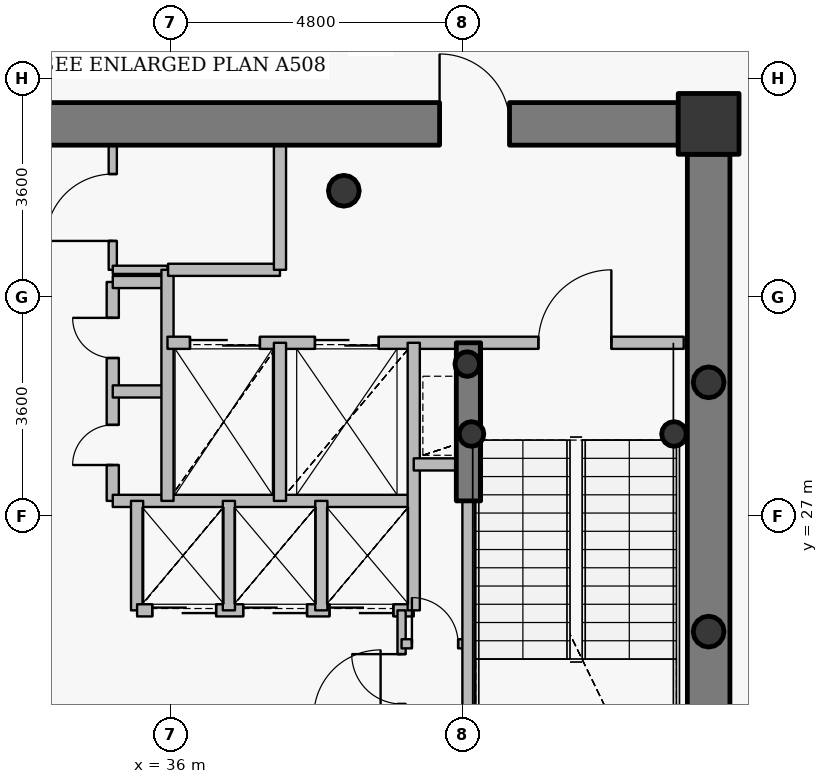
"""IFC4 building model, lengths in metres.
Left out: names, types, materials, properties, quantities, classifications, styles, units other than length and angle.
Written with IfcOpenShell. Run it as: python <this file> out.ifc"""

import sys

from ifc_helpers import new_model, si_unit, direction, frame, frame_2d, origin, origin_2d, place, context, subcontext, project, spatial, rectangle, hollow_circle, extrude, source, transform, mapped, element, fill, save


model = new_model("IFC4")
c1 = context("Model", 3, precision=1e-05, world=origin(), true_north=direction((0.0, 1.0)))
c2 = subcontext(c1, "Body", "Model", "MODEL_VIEW")
j1 = project(units=[si_unit("LENGTHUNIT", "METRE"), si_unit("PLANEANGLEUNIT", "RADIAN")], contexts=[c1])
p1 = place(None, origin())
s1 = spatial("IfcSite", under=j1, at=p1, CompositionType="ELEMENT")
p2 = place(p1, origin())
s2 = spatial("IfcBuilding", under=s1, at=p2, CompositionType="ELEMENT")
p3 = place(p2, frame((0.0, 0.0, 303.0)))
s3 = spatial("IfcBuildingStorey", under=s2, at=p3, CompositionType="ELEMENT", Elevation=303.0)
p4 = place(p3, frame((44.85, 33.45, 0.0), z_axis=(0.0, 0.0, 1.0), x_axis=(1.0, 0.0, 0.0)))
e1 = element("IfcColumn", 1, at=p4, inside=s3, PredefinedType="COLUMN", context=c2, shape_type="SweptSolid", body=[
    extrude(rectangle(XDim=1.0, YDim=1.0, at=origin_2d()), origin(), (0.0, 0.0, 1.0), 3.75),
])
p5 = place(p3, frame((38.85, 32.35, 0.0), z_axis=(0.0, 0.0, 1.0), x_axis=(1.0, 0.0, 0.0)))
e2 = element("IfcColumn", 2, at=p5, inside=s3, PredefinedType="COLUMN", context=c2, shape_type="SweptSolid", body=[
    extrude(hollow_circle(Radius=0.254, WallThickness=0.02, at=origin_2d()), origin(), (0.0, 0.0, 1.0), 3.75),
])
for number, where, z_axis, x_axis in (
    (3, (40.95, 28.35, 0.0), (0.0, 0.0, 1.0), (1.0, 0.0, 0.0)),
    (4, (44.28, 28.35, 0.0), (0.0, 0.0, 1.0), (1.0, 0.0, 0.0)),
    (5, (40.88, 29.5, 0.0), (0.0, 0.0, 1.0), (1.0, 0.0, 0.0)),
):
    element("IfcColumn", number, at=place(p3, frame(where, z_axis=z_axis, x_axis=x_axis)), inside=s3, PredefinedType="COLUMN", context=c2, shape_type="SweptSolid", body=[
        extrude(hollow_circle(Radius=0.203, WallThickness=0.016, at=origin_2d()), origin(), (0.0, 0.0, 1.0), 3.75),
    ])
p6 = place(p3, frame((27.65, 33.45, 0.0), z_axis=(0.0, 0.0, 1.0), x_axis=(1.0, 0.0, 0.0)))
e6 = element("IfcWall", 6, at=p6, inside=s3, PredefinedType="SHEAR", context=c2, shape_type="SweptSolid", body=[
    extrude(rectangle(XDim=16.7, YDim=0.7, at=frame_2d((8.35, 0.0))), origin(), (0.0, 0.0, 1.0), 3.05),
])
p7 = place(p6, frame((12.775, 0.0, 0.0)))
e7 = element("IfcOpeningElement", 7, at=p7, cuts=e6, PredefinedType="OPENING", context=c2, shape_type="SweptSolid", body=[
    extrude(rectangle(XDim=1.15, YDim=2.15, at=origin_2d()), frame((0.575, 0.36, 1.075), z_axis=(0.0, -1.0, 0.0), x_axis=(1.0, 0.0, 0.0)), (0.0, 0.0, 1.0), 0.72),
])
p8 = place(p3, frame((44.85, 32.95, 0.0), z_axis=(0.0, 0.0, 1.0), x_axis=(0.0, -1.0, 0.0)))
e8 = element("IfcWall", 8, at=p8, inside=s3, PredefinedType="SHEAR", context=c2, shape_type="SweptSolid", body=[
    extrude(rectangle(XDim=11.9, YDim=0.7, at=frame_2d((5.95, 0.0))), origin(), (0.0, 0.0, 1.0), 3.05),
])
p9 = place(p3, frame((40.9, 27.25, 0.0), z_axis=(0.0, 0.0, 1.0), x_axis=(0.0, 1.0, 0.0)))
e9 = element("IfcWall", 9, at=p9, inside=s3, PredefinedType="SHEAR", context=c2, shape_type="SweptSolid", body=[
    extrude(rectangle(XDim=2.6, YDim=0.4, at=frame_2d((1.3, 0.0))), origin(), (0.0, 0.0, 1.0), 3.1),
])
for number, where, z_axis, x_axis in (
    (10, (44.85, 25.1, 0.0), (0.0, 0.0, 1.0), (1.0, 0.0, 0.0)),
    (11, (44.85, 29.2, 0.0), (0.0, 0.0, 1.0), (1.0, 0.0, 0.0)),
):
    element("IfcColumn", number, at=place(p3, frame(where, z_axis=z_axis, x_axis=x_axis)), inside=s3, PredefinedType="COLUMN", context=c2, shape_type="SweptSolid", body=[
        extrude(hollow_circle(Radius=0.254, WallThickness=0.02, at=origin_2d()), origin(), (0.0, 0.0, 1.0), 3.75),
    ])
p10 = place(p3, frame((35.05, 27.25, 0.0), z_axis=(0.0, 0.0, 1.0), x_axis=(0.0, 1.0, 0.0)))
e12 = element("IfcWall", 12, at=p10, inside=s3, PredefinedType="PARTITIONING", context=c2, shape_type="SweptSolid", body=[
    extrude(rectangle(XDim=3.6, YDim=0.2, at=frame_2d((1.8, 0.0))), origin(), (0.0, 0.0, 1.0), 3.5),
])
p11 = place(p10, frame((0.59, 0.0, 0.0)))
e13 = element("IfcOpeningElement", 13, at=p11, cuts=e12, PredefinedType="OPENING", context=c2, shape_type="SweptSolid", body=[
    extrude(rectangle(XDim=0.66, YDim=2.05, at=origin_2d()), frame((0.33, 0.11, 1.025), z_axis=(0.0, -1.0, 0.0), x_axis=(1.0, 0.0, 0.0)), (0.0, 0.0, 1.0), 0.22),
])
p12 = place(p10, frame((2.35, 0.0, 0.0)))
e14 = element("IfcOpeningElement", 14, at=p12, cuts=e12, PredefinedType="OPENING", context=c2, shape_type="SweptSolid", body=[
    extrude(rectangle(XDim=0.66, YDim=2.05, at=origin_2d()), frame((0.33, 0.11, 1.025), z_axis=(0.0, -1.0, 0.0), x_axis=(1.0, 0.0, 0.0)), (0.0, 0.0, 1.0), 0.22),
])
p13 = place(p3, frame((35.05, 27.25, 0.0), z_axis=(0.0, 0.0, 1.0), x_axis=(1.0, 0.0, 0.0)))
e15 = element("IfcWall", 15, at=p13, inside=s3, PredefinedType="PARTITIONING", context=c2, shape_type="SweptSolid", body=[
    extrude(rectangle(XDim=4.95, YDim=0.2, at=frame_2d((2.475, 0.0))), origin(), (0.0, 0.0, 1.0), 3.085),
])
for number, where, z_axis, x_axis in (
    (16, (35.05, 29.05, 0.0), (0.0, 0.0, 1.0), (1.0, 0.0, 0.0)),
    (17, (35.05, 30.85, 0.0), (0.0, 0.0, 1.0), (1.0, 0.0, 0.0)),
):
    element("IfcWall", number, at=place(p3, frame(where, z_axis=z_axis, x_axis=x_axis)), inside=s3, PredefinedType="PARTITIONING", context=c2, shape_type="SweptSolid", body=[
        extrude(rectangle(XDim=0.9, YDim=0.2, at=frame_2d((0.45, 0.0))), origin(), (0.0, 0.0, 1.0), 3.5),
    ])
p14 = place(p3, frame((35.05, 31.05, 0.0), z_axis=(0.0, 0.0, 1.0), x_axis=(0.0, 1.0, 0.0)))
e18 = element("IfcWall", 18, at=p14, inside=s3, PredefinedType="PARTITIONING", context=c2, shape_type="SweptSolid", body=[
    extrude(rectangle(XDim=2.05, YDim=0.135, at=frame_2d((1.025, 0.0))), origin(), (0.0, 0.0, 1.0), 3.085),
])
p15 = place(p14, frame((0.475, 0.0, 0.0)))
e19 = element("IfcOpeningElement", 19, at=p15, cuts=e18, PredefinedType="OPENING", context=c2, shape_type="SweptSolid", body=[
    extrude(rectangle(XDim=1.1, YDim=2.15, at=origin_2d()), frame((0.55, 0.078, 1.075), z_axis=(0.0, -1.0, 0.0), x_axis=(1.0, 0.0, 0.0)), (0.0, 0.0, 1.0), 0.155),
])
p16 = place(p3, frame((35.05, 31.05, 0.0), z_axis=(0.0, 0.0, 1.0), x_axis=(1.0, 0.0, 0.0)))
e20 = element("IfcWall", 20, at=p16, inside=s3, PredefinedType="PARTITIONING", context=c2, shape_type="SweptSolid", body=[
    extrude(rectangle(XDim=0.9, YDim=0.135, at=frame_2d((0.45, 0.0))), origin(), (0.0, 0.0, 1.0), 3.5),
])
p17 = place(p3, frame((35.45, 25.45, 0.0), z_axis=(0.0, 0.0, 1.0), x_axis=(0.0, 1.0, 0.0)))
e21 = element("IfcWall", 21, at=p17, inside=s3, PredefinedType="PARTITIONING", context=c2, shape_type="SweptSolid", body=[
    extrude(rectangle(XDim=1.8, YDim=0.2, at=frame_2d((0.9, 0.0))), origin(), (0.0, 0.0, 1.0), 3.5),
])
p18 = place(p3, frame((35.45, 25.45, 0.0), z_axis=(0.0, 0.0, 1.0), x_axis=(1.0, 0.0, 0.0)))
e22 = element("IfcWall", 22, at=p18, inside=s3, PredefinedType="PARTITIONING", context=c2, shape_type="SweptSolid", body=[
    extrude(rectangle(XDim=4.55, YDim=0.2, at=frame_2d((2.275, 0.0))), origin(), (0.0, 0.0, 1.0), 3.085),
])
p19 = place(p18, frame((0.25, 0.0, 0.0)))
e23 = element("IfcOpeningElement", 23, at=p19, cuts=e22, PredefinedType="OPENING", context=c2, shape_type="SweptSolid", body=[
    extrude(rectangle(XDim=1.05, YDim=2.15, at=origin_2d()), frame((0.525, 0.11, 1.075), z_axis=(0.0, -1.0, 0.0), x_axis=(1.0, 0.0, 0.0)), (0.0, 0.0, 1.0), 0.22),
])
p20 = place(p18, frame((1.745, 0.0, 0.0)))
e24 = element("IfcOpeningElement", 24, at=p20, cuts=e22, PredefinedType="OPENING", context=c2, shape_type="SweptSolid", body=[
    extrude(rectangle(XDim=1.05, YDim=2.15, at=origin_2d()), frame((0.525, 0.11, 1.075), z_axis=(0.0, -1.0, 0.0), x_axis=(1.0, 0.0, 0.0)), (0.0, 0.0, 1.0), 0.22),
])
p21 = place(p18, frame((3.165, 0.0, 0.0)))
e25 = element("IfcOpeningElement", 25, at=p21, cuts=e22, PredefinedType="OPENING", context=c2, shape_type="SweptSolid", body=[
    extrude(rectangle(XDim=1.05, YDim=2.15, at=origin_2d()), frame((0.525, 0.11, 1.075), z_axis=(0.0, -1.0, 0.0), x_axis=(1.0, 0.0, 0.0)), (0.0, 0.0, 1.0), 0.22),
])
p22 = place(p3, frame((35.95, 27.25, 0.0), z_axis=(0.0, 0.0, 1.0), x_axis=(0.0, 1.0, 0.0)))
e26 = element("IfcWall", 26, at=p22, inside=s3, PredefinedType="PARTITIONING", context=c2, shape_type="SweptSolid", body=[
    extrude(rectangle(XDim=3.8, YDim=0.2, at=frame_2d((1.9, 0.0))), origin(), (0.0, 0.0, 1.0), 3.5),
])
p23 = place(p3, frame((35.95, 29.85, 0.0), z_axis=(0.0, 0.0, 1.0), x_axis=(1.0, 0.0, 0.0)))
e27 = element("IfcWall", 27, at=p23, inside=s3, PredefinedType="PARTITIONING", context=c2, shape_type="SweptSolid", body=[
    extrude(rectangle(XDim=8.49, YDim=0.2, at=frame_2d((4.245, 0.0))), origin(), (0.0, 0.0, 1.0), 3.085),
])
p24 = place(p23, frame((6.1, 0.0, 0.0)))
e28 = element("IfcOpeningElement", 28, at=p24, cuts=e27, PredefinedType="OPENING", context=c2, shape_type="SweptSolid", body=[
    extrude(rectangle(XDim=1.2, YDim=2.15, at=origin_2d()), frame((0.6, 0.11, 1.075), z_axis=(0.0, -1.0, 0.0), x_axis=(1.0, 0.0, 0.0)), (0.0, 0.0, 1.0), 0.22),
])
p25 = place(p23, frame((0.37, 0.0, 0.0)))
e29 = element("IfcOpeningElement", 29, at=p25, cuts=e27, PredefinedType="OPENING", context=c2, shape_type="SweptSolid", body=[
    extrude(rectangle(XDim=1.15, YDim=2.15, at=origin_2d()), frame((0.575, 0.11, 1.075), z_axis=(0.0, -1.0, 0.0), x_axis=(1.0, 0.0, 0.0)), (0.0, 0.0, 1.0), 0.22),
])
p26 = place(p23, frame((2.425, 0.0, 0.0)))
e30 = element("IfcOpeningElement", 30, at=p26, cuts=e27, PredefinedType="OPENING", context=c2, shape_type="SweptSolid", body=[
    extrude(rectangle(XDim=1.05, YDim=2.15, at=origin_2d()), frame((0.525, 0.11, 1.075), z_axis=(0.0, -1.0, 0.0), x_axis=(1.0, 0.0, 0.0)), (0.0, 0.0, 1.0), 0.22),
])
p27 = place(p3, frame((35.96, 31.05, 0.0), z_axis=(0.0, 0.0, 1.0), x_axis=(1.0, 0.0, 0.0)))
e31 = element("IfcWall", 31, at=p27, inside=s3, PredefinedType="PARTITIONING", context=c2, shape_type="SweptSolid", body=[
    extrude(rectangle(XDim=1.84, YDim=0.2, at=frame_2d((0.92, 0.0))), origin(), (0.0, 0.0, 1.0), 3.5),
])
p28 = place(p3, frame((36.96, 25.45, 0.0), z_axis=(0.0, 0.0, 1.0), x_axis=(0.0, 1.0, 0.0)))
e32 = element("IfcWall", 32, at=p28, inside=s3, PredefinedType="PARTITIONING", context=c2, shape_type="SweptSolid", body=[
    extrude(rectangle(XDim=1.8, YDim=0.2, at=frame_2d((0.9, 0.0))), origin(), (0.0, 0.0, 1.0), 3.5),
])
p29 = place(p3, frame((37.8, 27.25, 0.0), z_axis=(0.0, 0.0, 1.0), x_axis=(0.0, 1.0, 0.0)))
e33 = element("IfcWall", 33, at=p29, inside=s3, PredefinedType="PARTITIONING", context=c2, shape_type="SweptSolid", body=[
    extrude(rectangle(XDim=2.6, YDim=0.2, at=frame_2d((1.3, 0.0))), origin(), (0.0, 0.0, 1.0), 3.5),
])
p30 = place(p3, frame((37.8, 31.05, 0.0), z_axis=(0.0, 0.0, 1.0), x_axis=(0.0, 1.0, 0.0)))
e34 = element("IfcWall", 34, at=p30, inside=s3, PredefinedType="PARTITIONING", context=c2, shape_type="SweptSolid", body=[
    extrude(rectangle(XDim=2.05, YDim=0.2, at=frame_2d((1.025, 0.0))), origin(), (0.0, 0.0, 1.0), 3.085),
])
p31 = place(p3, frame((38.48, 25.45, 0.0), z_axis=(0.0, 0.0, 1.0), x_axis=(0.0, 1.0, 0.0)))
e35 = element("IfcWall", 35, at=p31, inside=s3, PredefinedType="PARTITIONING", context=c2, shape_type="SweptSolid", body=[
    extrude(rectangle(XDim=1.8, YDim=0.2, at=frame_2d((0.9, 0.0))), origin(), (0.0, 0.0, 1.0), 3.5),
])
p32 = place(p3, frame((39.8, 23.7, 0.0), z_axis=(0.0, 0.0, 1.0), x_axis=(0.0, 1.0, 0.0)))
e36 = element("IfcWall", 36, at=p32, inside=s3, PredefinedType="PARTITIONING", context=c2, shape_type="SweptSolid", body=[
    extrude(rectangle(XDim=1.75, YDim=0.135, at=frame_2d((0.875, 0.0))), origin(), (0.0, 0.0, 1.0), 3.5),
])
p33 = place(p32, frame((0.21, 0.0, 0.0)))
e37 = element("IfcOpeningElement", 37, at=p33, cuts=e36, PredefinedType="OPENING", context=c2, shape_type="SweptSolid", body=[
    extrude(rectangle(XDim=0.82, YDim=2.1, at=origin_2d()), frame((0.41, 0.078, 1.05), z_axis=(0.0, -1.0, 0.0), x_axis=(1.0, 0.0, 0.0)), (0.0, 0.0, 1.0), 0.155),
])
p34 = place(p3, frame((39.8, 24.9, 0.0), z_axis=(0.0, 0.0, 1.0), x_axis=(1.0, 0.0, 0.0)))
e38 = element("IfcWall", 38, at=p34, inside=s3, PredefinedType="PARTITIONING", context=c2, shape_type="SweptSolid", body=[
    extrude(rectangle(XDim=1.1, YDim=0.15, at=frame_2d((0.55, 0.0))), origin(), (0.0, 0.0, 1.0), 3.5),
])
p35 = place(p34, frame((0.17, 0.0, 0.0)))
e39 = element("IfcOpeningElement", 39, at=p35, cuts=e38, PredefinedType="OPENING", context=c2, shape_type="SweptSolid", body=[
    extrude(rectangle(XDim=0.76, YDim=2.1, at=origin_2d()), frame((0.38, 0.085, 1.05), z_axis=(0.0, -1.0, 0.0), x_axis=(1.0, 0.0, 0.0)), (0.0, 0.0, 1.0), 0.17),
])
p36 = place(p3, frame((40.0, 25.45, 0.0), z_axis=(0.0, 0.0, 1.0), x_axis=(0.0, 1.0, 0.0)))
e40 = element("IfcWall", 40, at=p36, inside=s3, PredefinedType="PARTITIONING", context=c2, shape_type="SweptSolid", body=[
    extrude(rectangle(XDim=4.4, YDim=0.2, at=frame_2d((2.2, 0.0))), origin(), (0.0, 0.0, 1.0), 3.5),
])
p37 = place(p3, frame((40.0, 27.85, 0.0), z_axis=(0.0, 0.0, 1.0), x_axis=(1.0, 0.0, 0.0)))
e41 = element("IfcWall", 41, at=p37, inside=s3, PredefinedType="PARTITIONING", context=c2, shape_type="SweptSolid", body=[
    extrude(rectangle(XDim=0.9, YDim=0.2, at=frame_2d((0.45, 0.0))), origin(), (0.0, 0.0, 1.0), 3.5),
])
p38 = place(p3, frame((40.9, 21.33, 0.0), z_axis=(0.0, 0.0, 1.0), x_axis=(0.0, 1.0, 0.0)))
e42 = element("IfcWall", 42, at=p38, inside=s3, PredefinedType="PARTITIONING", context=c2, shape_type="SweptSolid", body=[
    extrude(rectangle(XDim=5.91, YDim=0.2, at=frame_2d((2.955, 0.0))), origin(), (0.0, 0.0, 1.0), 3.035),
])
p39 = place(p3, frame((45.2, 33.8, 0.0), z_axis=(0.0, 0.0, 1.0), x_axis=(-1.0, 0.0, 0.0)))
e43 = element("IfcWall", 43, at=p39, inside=s3, PredefinedType="PARTITIONING", context=c2, shape_type="SweptSolid", body=[
    extrude(rectangle(XDim=0.84, YDim=0.135, at=frame_2d((0.42, 0.0))), origin(), (0.0, 0.0, 1.0), 3.035),
])
p40 = place(p3, frame((45.2, 32.96, 0.0), z_axis=(0.0, 0.0, 1.0), x_axis=(0.0, 1.0, 0.0)))
e44 = element("IfcWall", 44, at=p40, inside=s3, PredefinedType="PARTITIONING", context=c2, shape_type="SweptSolid", body=[
    extrude(rectangle(XDim=0.532, YDim=0.135, at=frame_2d((0.266, 0.0))), origin(), (0.0, 0.0, 1.0), 3.5),
])
m1 = source(origin(), c2, "Body", "SweptSolid", [
    extrude(rectangle(XDim=1.15, YDim=2.15, at=origin_2d()), frame((0.575, 0.025, 1.075), z_axis=(0.0, -1.0, 0.0), x_axis=(1.0, 0.0, 0.0)), (0.0, 0.0, 1.0), 0.05),
])
p41 = place(p7, origin())
e45 = element("IfcDoor", 45, at=p41, inside=s3, OperationType="SINGLE_SWING_LEFT", PredefinedType="DOOR", context=c2, shape_type="MappedRepresentation", body=[
    mapped(m1, transform((0.0, 0.0, 0.0), x_axis=(1.0, 0.0, 0.0), y_axis=(0.0, 1.0, 0.0), z_axis=(0.0, 0.0, 1.0), scale=1.0)),
])
fill(e7, e45)
m2 = source(origin(), c2, "Body", "SweptSolid", [
    extrude(rectangle(XDim=1.2, YDim=2.15, at=origin_2d()), frame((0.6, 0.025, 1.075), z_axis=(0.0, -1.0, 0.0), x_axis=(1.0, 0.0, 0.0)), (0.0, 0.0, 1.0), 0.05),
])
p42 = place(p24, origin())
e46 = element("IfcDoor", 46, at=p42, inside=s3, OperationType="SINGLE_SWING_RIGHT", PredefinedType="DOOR", context=c2, shape_type="MappedRepresentation", body=[
    mapped(m2, transform((0.0, 0.0, 0.0), x_axis=(1.0, 0.0, 0.0), y_axis=(0.0, 1.0, 0.0), z_axis=(0.0, 0.0, 1.0), scale=1.0)),
])
fill(e28, e46)
m3 = source(origin(), c2, "Body", "SweptSolid", [
    extrude(rectangle(XDim=1.15, YDim=2.15, at=origin_2d()), frame((0.575, 0.025, 1.075), z_axis=(0.0, -1.0, 0.0), x_axis=(1.0, 0.0, 0.0)), (0.0, 0.0, 1.0), 0.05),
])
p43 = place(p25, origin())
e47 = element("IfcDoor", 47, at=p43, inside=s3, OperationType="DOUBLE_DOOR_SLIDING", PredefinedType="USERDEFINED", context=c2, shape_type="MappedRepresentation", body=[
    mapped(m3, transform((0.0, 0.0, 0.0), x_axis=(1.0, 0.0, 0.0), y_axis=(0.0, 1.0, 0.0), z_axis=(0.0, 0.0, 1.0), scale=1.0)),
])
fill(e29, e47)
m4 = source(origin(), c2, "Body", "SweptSolid", [
    extrude(rectangle(XDim=1.05, YDim=2.15, at=origin_2d()), frame((0.525, 0.025, 1.075), z_axis=(0.0, -1.0, 0.0), x_axis=(1.0, 0.0, 0.0)), (0.0, 0.0, 1.0), 0.05),
])
p44 = place(p26, origin())
e48 = element("IfcDoor", 48, at=p44, inside=s3, OperationType="DOUBLE_DOOR_SLIDING", PredefinedType="USERDEFINED", context=c2, shape_type="MappedRepresentation", body=[
    mapped(m4, transform((0.0, 0.0, 0.0), x_axis=(1.0, 0.0, 0.0), y_axis=(0.0, 1.0, 0.0), z_axis=(0.0, 0.0, 1.0), scale=1.0)),
])
fill(e30, e48)
p45 = place(p19, origin())
e49 = element("IfcDoor", 49, at=p45, inside=s3, OperationType="DOUBLE_DOOR_SLIDING", PredefinedType="USERDEFINED", context=c2, shape_type="MappedRepresentation", body=[
    mapped(m4, transform((0.0, 0.0, 0.0), x_axis=(1.0, 0.0, 0.0), y_axis=(0.0, 1.0, 0.0), z_axis=(0.0, 0.0, 1.0), scale=1.0)),
])
fill(e23, e49)
p46 = place(p20, origin())
e50 = element("IfcDoor", 50, at=p46, inside=s3, OperationType="DOUBLE_DOOR_SLIDING", PredefinedType="USERDEFINED", context=c2, shape_type="MappedRepresentation", body=[
    mapped(m4, transform((0.0, 0.0, 0.0), x_axis=(1.0, 0.0, 0.0), y_axis=(0.0, 1.0, 0.0), z_axis=(0.0, 0.0, 1.0), scale=1.0)),
])
fill(e24, e50)
p47 = place(p21, origin())
e51 = element("IfcDoor", 51, at=p47, inside=s3, OperationType="DOUBLE_DOOR_SLIDING", PredefinedType="USERDEFINED", context=c2, shape_type="MappedRepresentation", body=[
    mapped(m4, transform((0.0, 0.0, 0.0), x_axis=(1.0, 0.0, 0.0), y_axis=(0.0, 1.0, 0.0), z_axis=(0.0, 0.0, 1.0), scale=1.0)),
])
fill(e25, e51)
m5 = source(origin(), c2, "Body", "SweptSolid", [
    extrude(rectangle(XDim=0.66, YDim=2.05, at=origin_2d()), frame((0.33, 0.025, 1.025), z_axis=(0.0, -1.0, 0.0), x_axis=(1.0, 0.0, 0.0)), (0.0, 0.0, 1.0), 0.05),
])
p48 = place(p11, origin())
e52 = element("IfcDoor", 52, at=p48, inside=s3, OperationType="SINGLE_SWING_LEFT", PredefinedType="USERDEFINED", context=c2, shape_type="MappedRepresentation", body=[
    mapped(m5, transform((0.0, 0.0, 0.0), x_axis=(1.0, 0.0, 0.0), y_axis=(0.0, 1.0, 0.0), z_axis=(0.0, 0.0, 1.0), scale=1.0)),
])
fill(e13, e52)
p49 = place(p12, origin())
e53 = element("IfcDoor", 53, at=p49, inside=s3, OperationType="SINGLE_SWING_RIGHT", PredefinedType="USERDEFINED", context=c2, shape_type="MappedRepresentation", body=[
    mapped(m5, transform((0.0, 0.0, 0.0), x_axis=(1.0, 0.0, 0.0), y_axis=(0.0, 1.0, 0.0), z_axis=(0.0, 0.0, 1.0), scale=1.0)),
])
fill(e14, e53)
m6 = source(origin(), c2, "Body", "SweptSolid", [
    extrude(rectangle(XDim=1.1, YDim=2.15, at=origin_2d()), frame((0.55, 0.025, 1.075), z_axis=(0.0, -1.0, 0.0), x_axis=(1.0, 0.0, 0.0)), (0.0, 0.0, 1.0), 0.05),
])
p50 = place(p15, origin())
e54 = element("IfcDoor", 54, at=p50, inside=s3, OperationType="SINGLE_SWING_LEFT", PredefinedType="DOOR", context=c2, shape_type="MappedRepresentation", body=[
    mapped(m6, transform((0.0, 0.0, 0.0), x_axis=(1.0, 0.0, 0.0), y_axis=(0.0, 1.0, 0.0), z_axis=(0.0, 0.0, 1.0), scale=1.0)),
])
fill(e19, e54)
m7 = source(origin(), c2, "Body", "SweptSolid", [
    extrude(rectangle(XDim=0.82, YDim=2.1, at=origin_2d()), frame((0.41, 0.025, 1.05), z_axis=(0.0, -1.0, 0.0), x_axis=(1.0, 0.0, 0.0)), (0.0, 0.0, 1.0), 0.05),
])
p51 = place(p33, origin())
e55 = element("IfcDoor", 55, at=p51, inside=s3, OperationType="SINGLE_SWING_RIGHT", PredefinedType="DOOR", context=c2, shape_type="MappedRepresentation", body=[
    mapped(m7, transform((0.0, 0.0, 0.0), x_axis=(1.0, 0.0, 0.0), y_axis=(0.0, 1.0, 0.0), z_axis=(0.0, 0.0, 1.0), scale=1.0)),
])
fill(e37, e55)
m8 = source(origin(), c2, "Body", "SweptSolid", [
    extrude(rectangle(XDim=0.76, YDim=2.1, at=origin_2d()), frame((0.38, 0.025, 1.05), z_axis=(0.0, -1.0, 0.0), x_axis=(1.0, 0.0, 0.0)), (0.0, 0.0, 1.0), 0.05),
])
p52 = place(p35, origin())
e56 = element("IfcDoor", 56, at=p52, inside=s3, OperationType="SINGLE_SWING_LEFT", PredefinedType="DOOR", context=c2, shape_type="MappedRepresentation", body=[
    mapped(m8, transform((0.0, 0.0, 0.0), x_axis=(1.0, 0.0, 0.0), y_axis=(0.0, 1.0, 0.0), z_axis=(0.0, 0.0, 1.0), scale=1.0)),
])
fill(e39, e56)
save(model, sys.argv[1])
